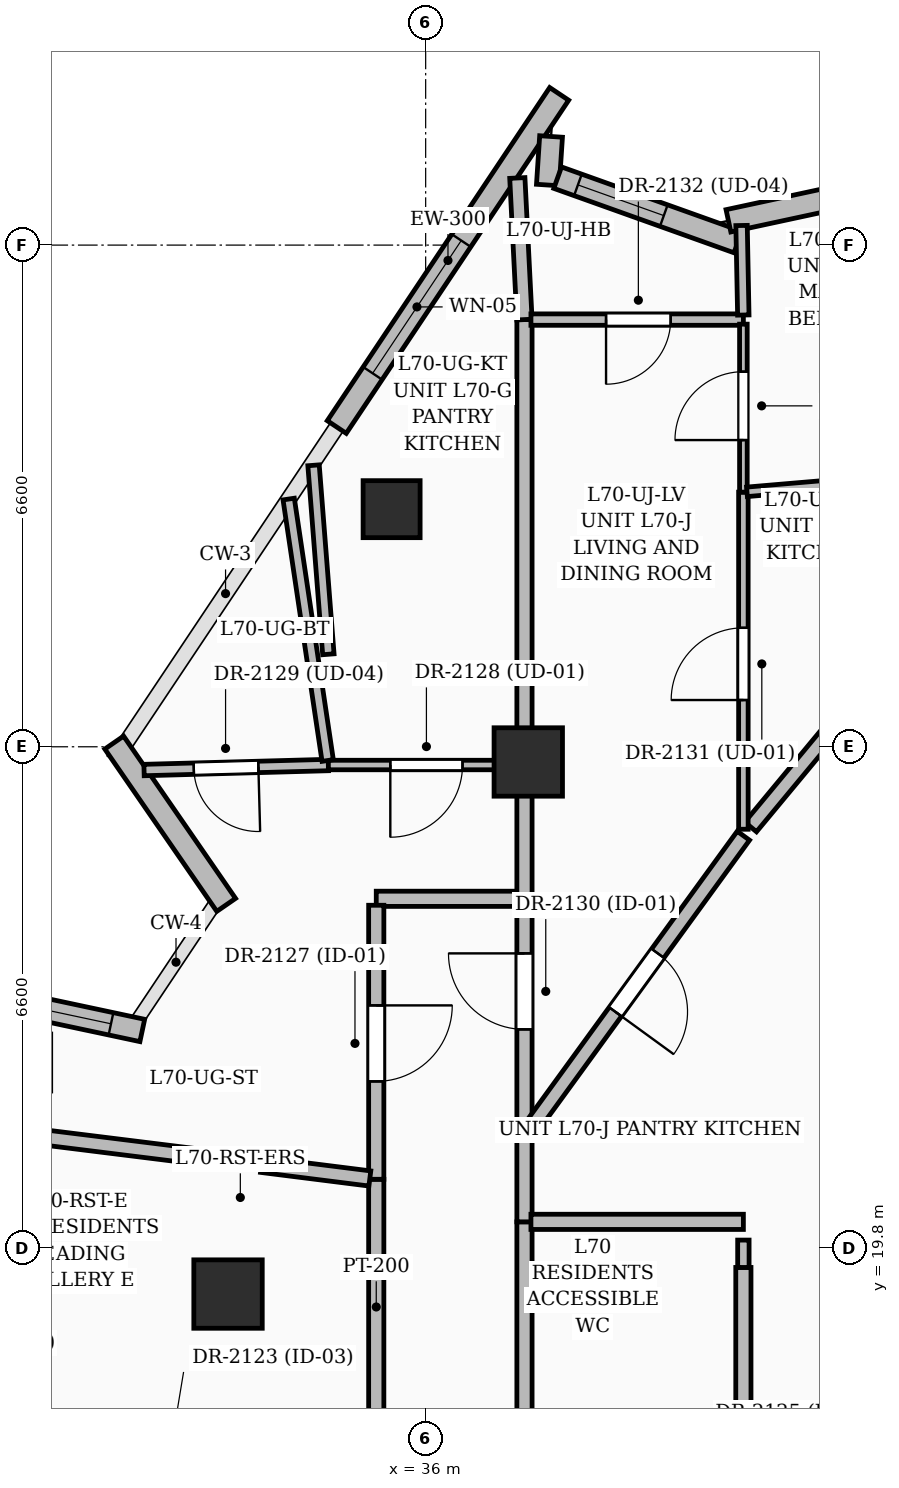
"""IFC4 building model, lengths in metres.
Left out: names, types, materials, properties, quantities, classifications, styles, units other than length and angle.
Written with IfcOpenShell. Run it as: python <this file> out.ifc"""

import sys

from ifc_helpers import new_model, si_unit, direction, frame, frame_2d, origin, origin_2d, place, context, subcontext, project, spatial, rectangle, extrude, element, fill, save


model = new_model("IFC4")
c1 = context("Model", 3, precision=1e-05, world=origin(), true_north=direction((0.0, 1.0)))
c2 = subcontext(c1, "Body", "Model", "MODEL_VIEW")
j1 = project(units=[si_unit("LENGTHUNIT", "METRE"), si_unit("PLANEANGLEUNIT", "RADIAN")], contexts=[c1])
p1 = place(None, origin())
s1 = spatial("IfcSite", under=j1, at=p1, CompositionType="ELEMENT")
p2 = place(p1, origin())
s2 = spatial("IfcBuilding", under=s1, at=p2, CompositionType="ELEMENT")
p3 = place(p2, frame((0.0, 0.0, 270.75)))
s3 = spatial("IfcBuildingStorey", under=s2, at=p3, CompositionType="ELEMENT", Elevation=270.75)
for number, where, z_axis, x_axis in (
    (1, (37.35, 26.2, 0.0), (0.0, 0.0, 1.0), (1.0, 0.0, 0.0)),
    (2, (33.4, 19.2, 0.0), (0.0, 0.0, 1.0), (1.0, 0.0, 0.0)),
):
    element("IfcColumn", number, at=place(p3, frame(where, z_axis=z_axis, x_axis=x_axis)), inside=s3, PredefinedType="COLUMN", context=c2, shape_type="SweptSolid", body=[
        extrude(rectangle(XDim=0.9, YDim=0.9, at=origin_2d()), origin(), (0.0, 0.0, 1.0), 3.75),
    ])
p4 = place(p3, frame((35.552, 29.526, 0.0), z_axis=(0.0, 0.0, 1.0), x_axis=(1.0, 0.0, 0.0)))
e3 = element("IfcColumn", 3, at=p4, inside=s3, PredefinedType="COLUMN", context=c2, shape_type="SweptSolid", body=[
    extrude(rectangle(XDim=0.75, YDim=0.75, at=origin_2d()), origin(), (0.0, 0.0, 1.0), 3.75),
])
p5 = place(p3, frame((29.735, 23.208, 0.0), z_axis=(0.0, 0.0, 1.0), x_axis=(0.978045557022, -0.208391190766, 0.0)))
e4 = element("IfcWall", 4, at=p5, inside=s3, PredefinedType="SOLIDWALL", context=c2, shape_type="SweptSolid", body=[
    extrude(rectangle(XDim=2.594, YDim=0.3, at=frame_2d((1.297, 0.0))), origin(), (0.0, 0.0, 1.0), 2.696),
])
p6 = place(p5, frame((0.973, 0.0, 0.8)))
e5 = element("IfcOpeningElement", 5, at=p6, cuts=e4, PredefinedType="OPENING", context=c2, shape_type="SweptSolid", body=[
    extrude(rectangle(XDim=1.2, YDim=1.8, at=frame_2d((0.6, 0.9))), frame((0.0, 0.16, 0.0), z_axis=(0.0, -1.0, 0.0), x_axis=(1.0, 0.0, 0.0)), (0.0, 0.0, 1.0), 0.32),
])
p7 = place(p3, frame((33.375, 24.32, 0.0), z_axis=(0.0, 0.0, 1.0), x_axis=(-0.567814329896, 0.823156659916, 0.0)))
e6 = element("IfcWall", 6, at=p7, inside=s3, PredefinedType="SOLIDWALL", context=c2, shape_type="SweptSolid", body=[
    extrude(rectangle(XDim=2.594, YDim=0.3, at=frame_2d((1.297, 0.0))), origin(), (0.0, 0.0, 1.0), 2.696),
])
p8 = place(p3, frame((34.831, 30.606, 0.0), z_axis=(0.0, 0.0, 1.0), x_axis=(0.555223932881, 0.831700898374, 0.0)))
e7 = element("IfcWall", 7, at=p8, inside=s3, PredefinedType="SOLIDWALL", context=c2, shape_type="SweptSolid", body=[
    extrude(rectangle(XDim=5.27, YDim=0.3, at=frame_2d((2.635, 0.0))), origin(), (0.0, 0.0, 1.0), 3.5),
])
p9 = place(p8, frame((0.85, 0.0, 0.55)))
e8 = element("IfcOpeningElement", 8, at=p9, cuts=e7, PredefinedType="OPENING", context=c2, shape_type="SweptSolid", body=[
    extrude(rectangle(XDim=2.1, YDim=2.4, at=frame_2d((1.05, 1.2))), frame((0.0, 0.16, 0.0), z_axis=(0.0, -1.0, 0.0), x_axis=(1.0, 0.0, 0.0)), (0.0, 0.0, 1.0), 0.32),
])
p10 = place(p3, frame((37.65, 34.429, 0.0), z_axis=(0.0, 0.0, 1.0), x_axis=(-0.065607578869, -0.997845501866, 0.0)))
e9 = element("IfcWall", 9, at=p10, inside=s3, PredefinedType="SOLIDWALL", context=c2, shape_type="SweptSolid", body=[
    extrude(rectangle(XDim=0.64, YDim=0.3, at=frame_2d((0.32, 0.0))), origin(), (0.0, 0.0, 1.0), 3.5),
])
p11 = place(p3, frame((37.737, 33.887, 0.0), z_axis=(0.0, 0.0, 1.0), x_axis=(0.941667304475, -0.33654522383, 0.0)))
e10 = element("IfcWall", 10, at=p11, inside=s3, PredefinedType="SOLIDWALL", context=c2, shape_type="SweptSolid", body=[
    extrude(rectangle(XDim=2.518, YDim=0.3, at=frame_2d((1.259, 0.0))), origin(), (0.0, 0.0, 1.0), 3.5),
])
p12 = place(p11, frame((0.283, 0.0, 0.8)))
e11 = element("IfcOpeningElement", 11, at=p12, cuts=e10, PredefinedType="OPENING", context=c2, shape_type="SweptSolid", body=[
    extrude(rectangle(XDim=1.2, YDim=1.8, at=frame_2d((0.6, 0.9))), frame((0.0, 0.16, 0.0), z_axis=(0.0, -1.0, 0.0), x_axis=(1.0, 0.0, 0.0)), (0.0, 0.0, 1.0), 0.32),
])
p13 = place(p3, frame((39.984, 33.319, 0.0), z_axis=(0.0, 0.0, 1.0), x_axis=(0.977595119272, 0.210494139526, 0.0)))
e12 = element("IfcWall", 12, at=p13, inside=s3, PredefinedType="SOLIDWALL", context=c2, shape_type="SweptSolid", body=[
    extrude(rectangle(XDim=1.797, YDim=0.3, at=frame_2d((0.898, 0.0))), origin(), (0.0, 0.0, 1.0), 3.5),
])
p14 = place(p3, frame((35.35, 20.71, 0.0), z_axis=(0.0, 0.0, 1.0), x_axis=(0.0, -1.0, 0.0)))
e13 = element("IfcWall", 13, at=p14, inside=s3, PredefinedType="PARTITIONING", context=c2, shape_type="SweptSolid", body=[
    extrude(rectangle(XDim=3.36, YDim=0.2, at=frame_2d((1.68, 0.0))), origin(), (0.0, 0.0, 1.0), 3.5),
])
p15 = place(p3, frame((37.255, 24.4, 0.0), z_axis=(0.0, 0.0, 1.0), x_axis=(-1.0, 0.0, 0.0)))
e14 = element("IfcWall", 14, at=p15, inside=s3, PredefinedType="PARTITIONING", context=c2, shape_type="SweptSolid", body=[
    extrude(rectangle(XDim=1.905, YDim=0.2, at=frame_2d((0.952, 0.0))), origin(), (0.0, 0.0, 1.0), 2.685),
])
p16 = place(p3, frame((35.35, 24.315, 0.0), z_axis=(0.0, 0.0, 1.0), x_axis=(0.0, -1.0, 0.0)))
e15 = element("IfcWall", 15, at=p16, inside=s3, PredefinedType="PARTITIONING", context=c2, shape_type="SweptSolid", body=[
    extrude(rectangle(XDim=3.605, YDim=0.2, at=frame_2d((1.802, 0.0))), origin(), (0.0, 0.0, 1.0), 2.685),
])
p17 = place(p16, frame((1.317, 0.0, 0.0)))
e16 = element("IfcOpeningElement", 16, at=p17, cuts=e15, PredefinedType="OPENING", context=c2, shape_type="SweptSolid", body=[
    extrude(rectangle(XDim=1.0, YDim=2.2, at=frame_2d((0.5, 1.1))), frame((0.0, 0.11, 0.0), z_axis=(0.0, -1.0, 0.0), x_axis=(1.0, 0.0, 0.0)), (0.0, 0.0, 1.0), 0.22),
])
p18 = place(p3, frame((37.3, 17.435, 0.0), z_axis=(0.0, 0.0, 1.0), x_axis=(0.0, 1.0, 0.0)))
e17 = element("IfcWall", 17, at=p18, inside=s3, PredefinedType="PARTITIONING", context=c2, shape_type="SweptSolid", body=[
    extrude(rectangle(XDim=2.715, YDim=0.2, at=frame_2d((1.357, 0.0))), origin(), (0.0, 0.0, 1.0), 3.5),
])
p19 = place(p3, frame((37.3, 20.15, 0.0), z_axis=(0.0, 0.0, 1.0), x_axis=(0.0, 1.0, 0.0)))
e18 = element("IfcWall", 18, at=p19, inside=s3, PredefinedType="PARTITIONING", context=c2, shape_type="SweptSolid", body=[
    extrude(rectangle(XDim=1.12, YDim=0.2, at=frame_2d((0.56, 0.0))), origin(), (0.0, 0.0, 1.0), 3.5),
])
p20 = place(p3, frame((37.3, 21.48, 0.0), z_axis=(0.0, 0.0, 1.0), x_axis=(0.0, 1.0, 0.0)))
e19 = element("IfcWall", 19, at=p20, inside=s3, PredefinedType="PARTITIONING", context=c2, shape_type="SweptSolid", body=[
    extrude(rectangle(XDim=2.835, YDim=0.2, at=frame_2d((1.417, 0.0))), origin(), (0.0, 0.0, 1.0), 3.5),
])
p21 = place(p20, frame((1.202, 0.0, 0.0)))
e20 = element("IfcOpeningElement", 20, at=p21, cuts=e19, PredefinedType="OPENING", context=c2, shape_type="SweptSolid", body=[
    extrude(rectangle(XDim=1.0, YDim=2.2, at=frame_2d((0.5, 1.1))), frame((0.0, 0.11, 0.0), z_axis=(0.0, -1.0, 0.0), x_axis=(1.0, 0.0, 0.0)), (0.0, 0.0, 1.0), 0.22),
])
p22 = place(p3, frame((33.4, 20.96, 0.0), z_axis=(0.0, 0.0, 1.0), x_axis=(-0.99236456913, 0.123339214916, 0.0)))
e21 = element("IfcWall", 21, at=p22, inside=s3, PredefinedType="PARTITIONING", context=c2, shape_type="SweptSolid", body=[
    extrude(rectangle(XDim=3.24, YDim=0.2, at=frame_2d((1.62, 0.0))), origin(), (0.0, 0.0, 1.0), 2.691),
])
p23 = place(p3, frame((35.266, 20.721, 0.0), z_axis=(0.0, 0.0, 1.0), x_axis=(-0.992191367148, 0.124724861018, 0.0)))
e22 = element("IfcWall", 22, at=p23, inside=s3, PredefinedType="PARTITIONING", context=c2, shape_type="SweptSolid", body=[
    extrude(rectangle(XDim=1.437, YDim=0.2, at=frame_2d((0.718, 0.0))), origin(), (0.0, 0.0, 1.0), 2.685),
])
p24 = place(p3, frame((34.72, 26.16, 0.0), z_axis=(0.0, 0.0, 1.0), x_axis=(-0.999630770767, -0.027172083772, 0.0)))
e23 = element("IfcWall", 23, at=p24, inside=s3, PredefinedType="PARTITIONING", context=c2, shape_type="SweptSolid", body=[
    extrude(rectangle(XDim=2.426, YDim=0.15, at=frame_2d((1.213, 0.0))), origin(), (0.0, 0.0, 1.0), 2.691),
])
p25 = place(p24, frame((0.921, 0.0, 0.0)))
e24 = element("IfcOpeningElement", 24, at=p25, cuts=e23, PredefinedType="OPENING", context=c2, shape_type="SweptSolid", body=[
    extrude(rectangle(XDim=0.85, YDim=2.1, at=frame_2d((0.425, 1.05))), frame((0.0, 0.085, 0.0), z_axis=(0.0, -1.0, 0.0), x_axis=(1.0, 0.0, 0.0)), (0.0, 0.0, 1.0), 0.17),
])
p26 = place(p3, frame((37.3, 26.16, 0.0), z_axis=(0.0, 0.0, 1.0), x_axis=(-1.0, 0.0, 0.0)))
e25 = element("IfcWall", 25, at=p26, inside=s3, PredefinedType="PARTITIONING", context=c2, shape_type="SweptSolid", body=[
    extrude(rectangle(XDim=2.58, YDim=0.125, at=frame_2d((1.29, 0.0))), origin(), (0.0, 0.0, 1.0), 2.862),
])
p27 = place(p26, frame((0.815, 0.0, 0.0)))
e26 = element("IfcOpeningElement", 26, at=p27, cuts=e25, PredefinedType="OPENING", context=c2, shape_type="SweptSolid", body=[
    extrude(rectangle(XDim=0.95, YDim=2.2, at=frame_2d((0.475, 1.1))), frame((0.0, 0.072, 0.0), z_axis=(0.0, -1.0, 0.0), x_axis=(1.0, 0.0, 0.0)), (0.0, 0.0, 1.0), 0.145),
])
p28 = place(p3, frame((37.3, 24.32, 0.0), z_axis=(0.0, 0.0, 1.0), x_axis=(0.0, 1.0, 0.0)))
e27 = element("IfcWall", 27, at=p28, inside=s3, PredefinedType="PARTITIONING", context=c2, shape_type="SweptSolid", body=[
    extrude(rectangle(XDim=1.792, YDim=0.2, at=frame_2d((0.896, 0.0))), origin(), (0.0, 0.0, 1.0), 2.685),
])
p29 = place(p3, frame((34.711, 26.219, 0.0), z_axis=(0.0, 0.0, 1.0), x_axis=(-0.147561165672, 0.989052932044, 0.0)))
e28 = element("IfcWall", 28, at=p29, inside=s3, PredefinedType="PARTITIONING", context=c2, shape_type="SweptSolid", body=[
    extrude(rectangle(XDim=3.478, YDim=0.15, at=frame_2d((1.739, 0.0))), origin(), (0.0, 0.0, 1.0), 2.691),
])
p30 = place(p3, frame((37.3, 26.208, 0.0), z_axis=(0.0, 0.0, 1.0), x_axis=(0.0, 1.0, 0.0)))
e29 = element("IfcWall", 29, at=p30, inside=s3, PredefinedType="PARTITIONING", context=c2, shape_type="SweptSolid", body=[
    extrude(rectangle(XDim=5.812, YDim=0.2, at=frame_2d((2.906, 0.0))), origin(), (0.0, 0.0, 1.0), 2.691),
])
p31 = place(p3, frame((37.3, 32.02, 0.0), z_axis=(0.0, 0.0, 1.0), x_axis=(-0.050388014823, 0.998729717172, 0.0)))
e30 = element("IfcWall", 30, at=p31, inside=s3, PredefinedType="PARTITIONING", context=c2, shape_type="SweptSolid", body=[
    extrude(rectangle(XDim=1.865, YDim=0.2, at=frame_2d((0.933, 0.0))), origin(), (0.0, 0.0, 1.0), 3.5),
])
p32 = place(p3, frame((40.18, 20.15, 0.0), z_axis=(0.0, 0.0, 1.0), x_axis=(-1.0, 0.0, 0.0)))
e31 = element("IfcWall", 31, at=p32, inside=s3, PredefinedType="PARTITIONING", context=c2, shape_type="SweptSolid", body=[
    extrude(rectangle(XDim=2.795, YDim=0.2, at=frame_2d((1.397, 0.0))), origin(), (0.0, 0.0, 1.0), 3.5),
])
p33 = place(p3, frame((40.18, 17.435, 0.0), z_axis=(0.0, 0.0, 1.0), x_axis=(0.0, 1.0, 0.0)))
e32 = element("IfcWall", 32, at=p33, inside=s3, PredefinedType="PARTITIONING", context=c2, shape_type="SweptSolid", body=[
    extrude(rectangle(XDim=2.115, YDim=0.2, at=frame_2d((1.058, 0.0))), origin(), (0.0, 0.0, 1.0), 3.5),
])
p34 = place(p3, frame((40.18, 25.23, 0.0), z_axis=(0.0, 0.0, 1.0), x_axis=(-0.588138509847, -0.808760219864, 0.0)))
e33 = element("IfcWall", 33, at=p34, inside=s3, PredefinedType="PARTITIONING", context=c2, shape_type="SweptSolid", body=[
    extrude(rectangle(XDim=4.812, YDim=0.2, at=frame_2d((2.406, 0.0))), origin(), (0.0, 0.0, 1.0), 3.5),
])
p35 = place(p34, frame((1.914, 0.0, 0.0)))
e34 = element("IfcOpeningElement", 34, at=p35, cuts=e33, PredefinedType="OPENING", context=c2, shape_type="SweptSolid", body=[
    extrude(rectangle(XDim=0.95, YDim=2.2, at=frame_2d((0.475, 1.1))), frame((0.0, 0.11, 0.0), z_axis=(0.0, -1.0, 0.0), x_axis=(1.0, 0.0, 0.0)), (0.0, 0.0, 1.0), 0.22),
])
p36 = place(p3, frame((43.926, 29.746, 0.0), z_axis=(0.0, 0.0, 1.0), x_axis=(-0.638469156573, -0.769647410251, 0.0)))
e35 = element("IfcWall", 35, at=p36, inside=s3, PredefinedType="PARTITIONING", context=c2, shape_type="SweptSolid", body=[
    extrude(rectangle(XDim=5.718, YDim=0.2, at=frame_2d((2.859, 0.0))), origin(), (0.0, 0.0, 1.0), 2.685),
])
p37 = place(p36, frame((1.972, 0.0, 0.0)))
e36 = element("IfcOpeningElement", 36, at=p37, cuts=e35, PredefinedType="OPENING", context=c2, shape_type="SweptSolid", body=[
    extrude(rectangle(XDim=1.0, YDim=2.2, at=frame_2d((0.5, 1.1))), frame((0.0, 0.11, 0.0), z_axis=(0.0, -1.0, 0.0), x_axis=(1.0, 0.0, 0.0)), (0.0, 0.0, 1.0), 0.22),
])
p38 = place(p3, frame((40.18, 32.02, 0.0), z_axis=(0.0, 0.0, 1.0), x_axis=(-1.0, 0.0, 0.0)))
e37 = element("IfcWall", 37, at=p38, inside=s3, PredefinedType="PARTITIONING", context=c2, shape_type="SweptSolid", body=[
    extrude(rectangle(XDim=2.795, YDim=0.15, at=frame_2d((1.397, 0.0))), origin(), (0.0, 0.0, 1.0), 3.5),
])
p39 = place(p38, frame((0.957, 0.0, 0.0)))
e38 = element("IfcOpeningElement", 38, at=p39, cuts=e37, PredefinedType="OPENING", context=c2, shape_type="SweptSolid", body=[
    extrude(rectangle(XDim=0.85, YDim=2.1, at=frame_2d((0.425, 1.05))), frame((0.0, 0.085, 0.0), z_axis=(0.0, -1.0, 0.0), x_axis=(1.0, 0.0, 0.0)), (0.0, 0.0, 1.0), 0.17),
])
p40 = place(p3, frame((40.18, 25.315, 0.0), z_axis=(0.0, 0.0, 1.0), x_axis=(0.0, 1.0, 0.0)))
e39 = element("IfcWall", 39, at=p40, inside=s3, PredefinedType="PARTITIONING", context=c2, shape_type="SweptSolid", body=[
    extrude(rectangle(XDim=4.435, YDim=0.125, at=frame_2d((2.218, 0.0))), origin(), (0.0, 0.0, 1.0), 2.685),
])
p41 = place(p40, frame((1.7, 0.0, 0.0)))
e40 = element("IfcOpeningElement", 40, at=p41, cuts=e39, PredefinedType="OPENING", context=c2, shape_type="SweptSolid", body=[
    extrude(rectangle(XDim=0.95, YDim=2.2, at=frame_2d((0.475, 1.1))), frame((0.0, 0.072, 0.0), z_axis=(0.0, -1.0, 0.0), x_axis=(1.0, 0.0, 0.0)), (0.0, 0.0, 1.0), 0.145),
])
p42 = place(p3, frame((40.18, 29.75, 0.0), z_axis=(0.0, 0.0, 1.0), x_axis=(0.0, 1.0, 0.0)))
e41 = element("IfcWall", 41, at=p42, inside=s3, PredefinedType="PARTITIONING", context=c2, shape_type="SweptSolid", body=[
    extrude(rectangle(XDim=2.21, YDim=0.1, at=frame_2d((1.105, 0.0))), origin(), (0.0, 0.0, 1.0), 3.5),
])
p43 = place(p42, frame((0.685, 0.0, 0.0)))
e42 = element("IfcOpeningElement", 42, at=p43, cuts=e41, PredefinedType="OPENING", context=c2, shape_type="SweptSolid", body=[
    extrude(rectangle(XDim=0.9, YDim=2.15, at=frame_2d((0.45, 1.075))), frame((0.0, 0.06, 0.0), z_axis=(0.0, -1.0, 0.0), x_axis=(1.0, 0.0, 0.0)), (0.0, 0.0, 1.0), 0.12),
])
p44 = place(p3, frame((40.179, 32.08, 0.0), z_axis=(0.0, 0.0, 1.0), x_axis=(-0.019685303924, 0.99980622563, 0.0)))
e43 = element("IfcWall", 43, at=p44, inside=s3, PredefinedType="PARTITIONING", context=c2, shape_type="SweptSolid", body=[
    extrude(rectangle(XDim=1.178, YDim=0.15, at=frame_2d((0.589, 0.0))), origin(), (0.0, 0.0, 1.0), 3.5),
])
p45 = place(p3, frame((43.803, 30.058, 0.0), z_axis=(0.0, 0.0, 1.0), x_axis=(-0.996400697419, -0.08476821446, 0.0)))
e44 = element("IfcWall", 44, at=p45, inside=s3, PredefinedType="PARTITIONING", context=c2, shape_type="SweptSolid", body=[
    extrude(rectangle(XDim=3.589, YDim=0.125, at=frame_2d((1.794, 0.0))), origin(), (0.0, 0.0, 1.0), 2.691),
])
p46 = place(p3, frame((34.72, 27.617, 0.0), z_axis=(0.0, 0.0, 1.0), x_axis=(-0.07822367975, 0.996935833405, 0.0)))
e45 = element("IfcWall", 45, at=p46, inside=s3, PredefinedType="PARTITIONING", context=c2, shape_type="SweptSolid", body=[
    extrude(rectangle(XDim=2.494, YDim=0.15, at=frame_2d((1.247, 0.0))), origin(), (0.0, 0.0, 1.0), 2.691),
])
p47 = place(p3, frame((40.18, 19.55, 0.0), z_axis=(0.0, 0.0, 1.0), x_axis=(0.0, 1.0, 0.0)))
e46 = element("IfcWall", 46, at=p47, inside=s3, PredefinedType="PARTITIONING", context=c2, shape_type="SweptSolid", body=[
    extrude(rectangle(XDim=0.36, YDim=0.15, at=frame_2d((0.18, 0.0))), origin(), (0.0, 0.0, 1.0), 3.5),
])
p48 = place(p9, origin())
e47 = element("IfcWindow", 47, at=p48, inside=s3, PartitioningType="SINGLE_PANEL", PredefinedType="WINDOW", context=c2, shape_type="SweptSolid", body=[
    extrude(rectangle(XDim=2.1, YDim=2.4, at=frame_2d((1.05, 1.2))), frame((0.0, 0.03, 0.0), z_axis=(0.0, -1.0, 0.0), x_axis=(1.0, 0.0, 0.0)), (0.0, 0.0, 1.0), 0.06),
])
fill(e8, e47)
p49 = place(p12, origin())
e48 = element("IfcWindow", 48, at=p49, inside=s3, PartitioningType="SINGLE_PANEL", PredefinedType="WINDOW", context=c2, shape_type="SweptSolid", body=[
    extrude(rectangle(XDim=1.2, YDim=1.8, at=frame_2d((0.6, 0.9))), frame((0.0, 0.03, 0.0), z_axis=(0.0, -1.0, 0.0), x_axis=(1.0, 0.0, 0.0)), (0.0, 0.0, 1.0), 0.06),
])
fill(e11, e48)
p50 = place(p17, origin())
e49 = element("IfcDoor", 49, at=p50, inside=s3, OperationType="SINGLE_SWING_LEFT", PredefinedType="DOOR", context=c2, shape_type="SweptSolid", body=[
    extrude(rectangle(XDim=1.0, YDim=2.2, at=frame_2d((0.5, 1.1))), frame((0.0, 0.025, 0.0), z_axis=(0.0, -1.0, 0.0), x_axis=(1.0, 0.0, 0.0)), (0.0, 0.0, 1.0), 0.05),
])
fill(e16, e49)
p51 = place(p27, origin())
e50 = element("IfcDoor", 50, at=p51, inside=s3, OperationType="SINGLE_SWING_RIGHT", PredefinedType="DOOR", context=c2, shape_type="SweptSolid", body=[
    extrude(rectangle(XDim=0.95, YDim=2.2, at=frame_2d((0.475, 1.1))), frame((0.0, 0.025, 0.0), z_axis=(0.0, -1.0, 0.0), x_axis=(1.0, 0.0, 0.0)), (0.0, 0.0, 1.0), 0.05),
])
fill(e26, e50)
p52 = place(p25, origin())
e51 = element("IfcDoor", 51, at=p52, inside=s3, OperationType="SINGLE_SWING_LEFT", PredefinedType="DOOR", context=c2, shape_type="SweptSolid", body=[
    extrude(rectangle(XDim=0.85, YDim=2.1, at=frame_2d((0.425, 1.05))), frame((0.0, 0.025, 0.0), z_axis=(0.0, -1.0, 0.0), x_axis=(1.0, 0.0, 0.0)), (0.0, 0.0, 1.0), 0.05),
])
fill(e24, e51)
p53 = place(p21, origin())
e52 = element("IfcDoor", 52, at=p53, inside=s3, OperationType="SINGLE_SWING_RIGHT", PredefinedType="DOOR", context=c2, shape_type="SweptSolid", body=[
    extrude(rectangle(XDim=1.0, YDim=2.2, at=frame_2d((0.5, 1.1))), frame((0.0, 0.025, 0.0), z_axis=(0.0, -1.0, 0.0), x_axis=(1.0, 0.0, 0.0)), (0.0, 0.0, 1.0), 0.05),
])
fill(e20, e52)
p54 = place(p41, origin())
e53 = element("IfcDoor", 53, at=p54, inside=s3, OperationType="SINGLE_SWING_LEFT", PredefinedType="DOOR", context=c2, shape_type="SweptSolid", body=[
    extrude(rectangle(XDim=0.95, YDim=2.2, at=frame_2d((0.475, 1.1))), frame((0.0, 0.025, 0.0), z_axis=(0.0, -1.0, 0.0), x_axis=(1.0, 0.0, 0.0)), (0.0, 0.0, 1.0), 0.05),
])
fill(e40, e53)
p55 = place(p39, origin())
e54 = element("IfcDoor", 54, at=p55, inside=s3, OperationType="SINGLE_SWING_RIGHT", PredefinedType="DOOR", context=c2, shape_type="SweptSolid", body=[
    extrude(rectangle(XDim=0.85, YDim=2.1, at=frame_2d((0.425, 1.05))), frame((0.0, 0.025, 0.0), z_axis=(0.0, -1.0, 0.0), x_axis=(1.0, 0.0, 0.0)), (0.0, 0.0, 1.0), 0.05),
])
fill(e38, e54)
p56 = place(p43, origin())
e55 = element("IfcDoor", 55, at=p56, inside=s3, OperationType="SINGLE_SWING_LEFT", PredefinedType="DOOR", context=c2, shape_type="SweptSolid", body=[
    extrude(rectangle(XDim=0.9, YDim=2.15, at=frame_2d((0.45, 1.075))), frame((0.0, 0.025, 0.0), z_axis=(0.0, -1.0, 0.0), x_axis=(1.0, 0.0, 0.0)), (0.0, 0.0, 1.0), 0.05),
])
fill(e42, e55)
p57 = place(p35, origin())
e56 = element("IfcDoor", 56, at=p57, inside=s3, OperationType="SINGLE_SWING_RIGHT", PredefinedType="DOOR", context=c2, shape_type="SweptSolid", body=[
    extrude(rectangle(XDim=0.95, YDim=2.2, at=frame_2d((0.475, 1.1))), frame((0.0, 0.025, 0.0), z_axis=(0.0, -1.0, 0.0), x_axis=(1.0, 0.0, 0.0)), (0.0, 0.0, 1.0), 0.05),
])
fill(e34, e56)
p58 = place(p6, origin())
e57 = element("IfcWindow", 57, at=p58, inside=s3, PartitioningType="SINGLE_PANEL", PredefinedType="WINDOW", context=c2, shape_type="SweptSolid", body=[
    extrude(rectangle(XDim=1.2, YDim=1.8, at=frame_2d((0.6, 0.9))), frame((0.0, 0.03, 0.0), z_axis=(0.0, -1.0, 0.0), x_axis=(1.0, 0.0, 0.0)), (0.0, 0.0, 1.0), 0.06),
])
fill(e5, e57)
save(model, sys.argv[1])
